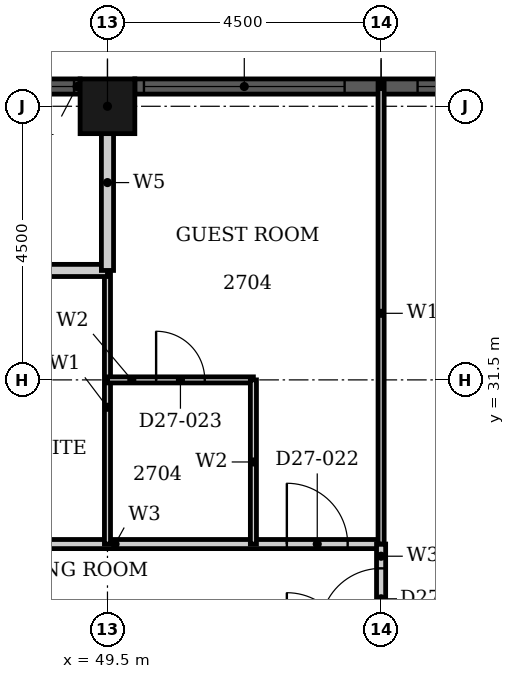
"""IFC4 building model, lengths in metres.
Left out: names, types, materials, properties, quantities, classifications, styles, units other than length and angle.
Written with IfcOpenShell. Run it as: python <this file> out.ifc"""

import sys

from ifc_helpers import new_model, si_unit, direction, frame, frame_2d, origin, origin_2d, place, context, subcontext, project, spatial, rectangle, hollow_rectangle, extrude, element, fill, save


model = new_model("IFC4")
c1 = context("Model", 3, precision=1e-05, world=origin(), true_north=direction((0.0, 1.0)))
c2 = subcontext(c1, "Body", "Model", "MODEL_VIEW")
j1 = project(units=[si_unit("LENGTHUNIT", "METRE"), si_unit("PLANEANGLEUNIT", "RADIAN")], contexts=[c1])
p1 = place(None, origin())
s1 = spatial("IfcSite", under=j1, at=p1, CompositionType="ELEMENT")
p2 = place(p1, origin())
s2 = spatial("IfcBuilding", under=s1, at=p2, CompositionType="ELEMENT")
p3 = place(p2, frame((0.0, 0.0, 111.6)))
s3 = spatial("IfcBuildingStorey", under=s2, at=p3, CompositionType="ELEMENT", Elevation=111.6)
p4 = place(p3, frame((49.5, 36.0, 0.0), z_axis=(0.0, 0.0, 1.0), x_axis=(1.0, 0.0, 0.0)))
e1 = element("IfcColumn", 1, at=p4, inside=s3, PredefinedType="COLUMN", context=c2, shape_type="SweptSolid", body=[
    extrude(hollow_rectangle(XDim=0.9, YDim=0.9, WallThickness=0.028, at=origin_2d()), origin(), (0.0, 0.0, 1.0), 3.6),
])
p5 = place(p3, frame((58.05, 36.325, 0.0), z_axis=(0.0, 0.0, 1.0), x_axis=(-1.0, 0.0, 0.0)))
e2 = element("IfcWall", 2, at=p5, inside=s3, PredefinedType="SOLIDWALL", context=c2, shape_type="SweptSolid", body=[
    extrude(rectangle(XDim=8.1, YDim=0.25, at=frame_2d((4.05, 0.0))), origin(), (0.0, 0.0, 1.0), 3.6),
])
p6 = place(p5, frame((0.15, 0.0, 0.9)))
e3 = element("IfcOpeningElement", 3, at=p6, cuts=e2, PredefinedType="OPENING", context=c2, shape_type="SweptSolid", body=[
    extrude(rectangle(XDim=3.3, YDim=2.08, at=frame_2d((1.65, 1.04))), frame((0.0, 0.135, 0.0), z_axis=(0.0, -1.0, 0.0), x_axis=(1.0, 0.0, 0.0)), (0.0, 0.0, 1.0), 0.27),
])
p7 = place(p5, frame((4.65, 0.0, 0.9)))
e4 = element("IfcOpeningElement", 4, at=p7, cuts=e2, PredefinedType="OPENING", context=c2, shape_type="SweptSolid", body=[
    extrude(rectangle(XDim=3.3, YDim=2.08, at=frame_2d((1.65, 1.04))), frame((0.0, 0.135, 0.0), z_axis=(0.0, -1.0, 0.0), x_axis=(1.0, 0.0, 0.0)), (0.0, 0.0, 1.0), 0.27),
])
p8 = place(p3, frame((49.05, 36.325, 0.0), z_axis=(0.0, 0.0, 1.0), x_axis=(-1.0, 0.0, 0.0)))
e5 = element("IfcWall", 5, at=p8, inside=s3, PredefinedType="SOLIDWALL", context=c2, shape_type="SweptSolid", body=[
    extrude(rectangle(XDim=1.35, YDim=0.25, at=frame_2d((0.675, 0.0))), origin(), (0.0, 0.0, 1.0), 3.6),
])
p9 = place(p8, frame((0.1, 0.0, 0.9)))
e6 = element("IfcOpeningElement", 6, at=p9, cuts=e5, PredefinedType="OPENING", context=c2, shape_type="SweptSolid", body=[
    extrude(rectangle(XDim=1.15, YDim=2.08, at=frame_2d((0.575, 1.04))), frame((0.0, 0.135, 0.0), z_axis=(0.0, -1.0, 0.0), x_axis=(1.0, 0.0, 0.0)), (0.0, 0.0, 1.0), 0.27),
])
p10 = place(p3, frame((46.8, 28.8, 0.0), z_axis=(0.0, 0.0, 1.0), x_axis=(1.0, 0.0, 0.0)))
e7 = element("IfcWall", 7, at=p10, inside=s3, PredefinedType="PARTITIONING", context=c2, shape_type="SweptSolid", body=[
    extrude(rectangle(XDim=7.2, YDim=0.15, at=frame_2d((3.6, 0.0))), origin(), (0.0, 0.0, 1.0), 3.3),
])
p11 = place(p10, frame((5.65, 0.0, 0.0)))
e8 = element("IfcOpeningElement", 8, at=p11, cuts=e7, PredefinedType="OPENING", context=c2, shape_type="SweptSolid", body=[
    extrude(rectangle(XDim=1.0, YDim=2.1, at=frame_2d((0.5, 1.05))), frame((0.0, 0.085, 0.0), z_axis=(0.0, -1.0, 0.0), x_axis=(1.0, 0.0, 0.0)), (0.0, 0.0, 1.0), 0.17),
])
p12 = place(p3, frame((54.0, 27.0, 0.0), z_axis=(0.0, 0.0, 1.0), x_axis=(0.0, 1.0, 0.0)))
e9 = element("IfcWall", 9, at=p12, inside=s3, PredefinedType="PARTITIONING", context=c2, shape_type="SweptSolid", body=[
    extrude(rectangle(XDim=1.8, YDim=0.15, at=frame_2d((0.9, 0.0))), origin(), (0.0, 0.0, 1.0), 3.3),
])
p13 = place(p12, frame((0.4, 0.0, 0.0)))
e10 = element("IfcOpeningElement", 10, at=p13, cuts=e9, PredefinedType="OPENING", context=c2, shape_type="SweptSolid", body=[
    extrude(rectangle(XDim=1.0, YDim=2.1, at=frame_2d((0.5, 1.05))), frame((0.0, 0.085, 0.0), z_axis=(0.0, -1.0, 0.0), x_axis=(1.0, 0.0, 0.0)), (0.0, 0.0, 1.0), 0.17),
])
p14 = place(p3, frame((49.5, 28.8, 0.0), z_axis=(0.0, 0.0, 1.0), x_axis=(0.0, 1.0, 0.0)))
e11 = element("IfcWall", 11, at=p14, inside=s3, PredefinedType="PARTITIONING", context=c2, shape_type="SweptSolid", body=[
    extrude(rectangle(XDim=4.5, YDim=0.1, at=frame_2d((2.25, 0.0))), origin(), (0.0, 0.0, 1.0), 2.38),
])
p15 = place(p3, frame((54.0, 28.8, 0.0), z_axis=(0.0, 0.0, 1.0), x_axis=(0.0, 1.0, 0.0)))
e12 = element("IfcWall", 12, at=p15, inside=s3, PredefinedType="PARTITIONING", context=c2, shape_type="SweptSolid", body=[
    extrude(rectangle(XDim=7.59, YDim=0.1, at=frame_2d((3.795, 0.0))), origin(), (0.0, 0.0, 1.0), 3.3),
])
p16 = place(p3, frame((49.5, 31.5, 0.0), z_axis=(0.0, 0.0, 1.0), x_axis=(1.0, 0.0, 0.0)))
e13 = element("IfcWall", 13, at=p16, inside=s3, PredefinedType="PARTITIONING", context=c2, shape_type="SweptSolid", body=[
    extrude(rectangle(XDim=2.4, YDim=0.1, at=frame_2d((1.2, 0.0))), origin(), (0.0, 0.0, 1.0), 2.58),
])
p17 = place(p16, frame((0.8, 0.0, 0.0)))
e14 = element("IfcOpeningElement", 14, at=p17, cuts=e13, PredefinedType="OPENING", context=c2, shape_type="SweptSolid", body=[
    extrude(rectangle(XDim=0.8, YDim=2.1, at=frame_2d((0.4, 1.05))), frame((0.0, 0.06, 0.0), z_axis=(0.0, -1.0, 0.0), x_axis=(1.0, 0.0, 0.0)), (0.0, 0.0, 1.0), 0.12),
])
p18 = place(p3, frame((51.9, 28.8, 0.0), z_axis=(0.0, 0.0, 1.0), x_axis=(0.0, 1.0, 0.0)))
e15 = element("IfcWall", 15, at=p18, inside=s3, PredefinedType="PARTITIONING", context=c2, shape_type="SweptSolid", body=[
    extrude(rectangle(XDim=2.7, YDim=0.1, at=frame_2d((1.35, 0.0))), origin(), (0.0, 0.0, 1.0), 3.3),
])
p19 = place(p3, frame((45.0, 33.3, 0.0), z_axis=(0.0, 0.0, 1.0), x_axis=(1.0, 0.0, 0.0)))
e16 = element("IfcWall", 16, at=p19, inside=s3, PredefinedType="PARTITIONING", context=c2, shape_type="SweptSolid", body=[
    extrude(rectangle(XDim=4.5, YDim=0.2, at=frame_2d((2.25, 0.0))), origin(), (0.0, 0.0, 1.0), 3.3),
])
p20 = place(p19, frame((0.45, 0.0, 0.0)))
e17 = element("IfcOpeningElement", 17, at=p20, cuts=e16, PredefinedType="OPENING", context=c2, shape_type="SweptSolid", body=[
    extrude(rectangle(XDim=0.9, YDim=2.1, at=frame_2d((0.45, 1.05))), frame((0.0, 0.11, 0.0), z_axis=(0.0, -1.0, 0.0), x_axis=(1.0, 0.0, 0.0)), (0.0, 0.0, 1.0), 0.22),
])
p21 = place(p3, frame((49.5, 33.3, 0.0), z_axis=(0.0, 0.0, 1.0), x_axis=(0.0, 1.0, 0.0)))
e18 = element("IfcWall", 18, at=p21, inside=s3, PredefinedType="PARTITIONING", context=c2, shape_type="SweptSolid", body=[
    extrude(rectangle(XDim=2.89, YDim=0.2, at=frame_2d((1.445, 0.0))), origin(), (0.0, 0.0, 1.0), 2.38),
])
p22 = place(p6, origin())
e19 = element("IfcWindow", 19, at=p22, inside=s3, PartitioningType="SINGLE_PANEL", PredefinedType="WINDOW", context=c2, shape_type="SweptSolid", body=[
    extrude(rectangle(XDim=3.3, YDim=2.08, at=frame_2d((1.65, 1.04))), frame((0.0, 0.03, 0.0), z_axis=(0.0, -1.0, 0.0), x_axis=(1.0, 0.0, 0.0)), (0.0, 0.0, 1.0), 0.06),
])
fill(e3, e19)
p23 = place(p7, origin())
e20 = element("IfcWindow", 20, at=p23, inside=s3, PartitioningType="SINGLE_PANEL", PredefinedType="WINDOW", context=c2, shape_type="SweptSolid", body=[
    extrude(rectangle(XDim=3.3, YDim=2.08, at=frame_2d((1.65, 1.04))), frame((0.0, 0.03, 0.0), z_axis=(0.0, -1.0, 0.0), x_axis=(1.0, 0.0, 0.0)), (0.0, 0.0, 1.0), 0.06),
])
fill(e4, e20)
p24 = place(p9, origin())
e21 = element("IfcWindow", 21, at=p24, inside=s3, PartitioningType="SINGLE_PANEL", PredefinedType="WINDOW", context=c2, shape_type="SweptSolid", body=[
    extrude(rectangle(XDim=1.15, YDim=2.08, at=frame_2d((0.575, 1.04))), frame((0.0, 0.03, 0.0), z_axis=(0.0, -1.0, 0.0), x_axis=(1.0, 0.0, 0.0)), (0.0, 0.0, 1.0), 0.06),
])
fill(e6, e21)
p25 = place(p11, origin())
e22 = element("IfcDoor", 22, at=p25, inside=s3, OperationType="SINGLE_SWING_RIGHT", PredefinedType="DOOR", context=c2, shape_type="SweptSolid", body=[
    extrude(rectangle(XDim=1.0, YDim=2.1, at=frame_2d((0.5, 1.05))), frame((0.0, 0.025, 0.0), z_axis=(0.0, -1.0, 0.0), x_axis=(1.0, 0.0, 0.0)), (0.0, 0.0, 1.0), 0.05),
])
fill(e8, e22)
p26 = place(p17, origin())
e23 = element("IfcDoor", 23, at=p26, inside=s3, OperationType="SINGLE_SWING_RIGHT", PredefinedType="DOOR", context=c2, shape_type="SweptSolid", body=[
    extrude(rectangle(XDim=0.8, YDim=2.1, at=frame_2d((0.4, 1.05))), frame((0.0, 0.025, 0.0), z_axis=(0.0, -1.0, 0.0), x_axis=(1.0, 0.0, 0.0)), (0.0, 0.0, 1.0), 0.05),
])
fill(e14, e23)
p27 = place(p13, origin())
e24 = element("IfcDoor", 24, at=p27, inside=s3, OperationType="SINGLE_SWING_LEFT", PredefinedType="DOOR", context=c2, shape_type="SweptSolid", body=[
    extrude(rectangle(XDim=1.0, YDim=2.1, at=frame_2d((0.5, 1.05))), frame((0.0, 0.025, 0.0), z_axis=(0.0, -1.0, 0.0), x_axis=(1.0, 0.0, 0.0)), (0.0, 0.0, 1.0), 0.05),
])
fill(e10, e24)
save(model, sys.argv[1])
